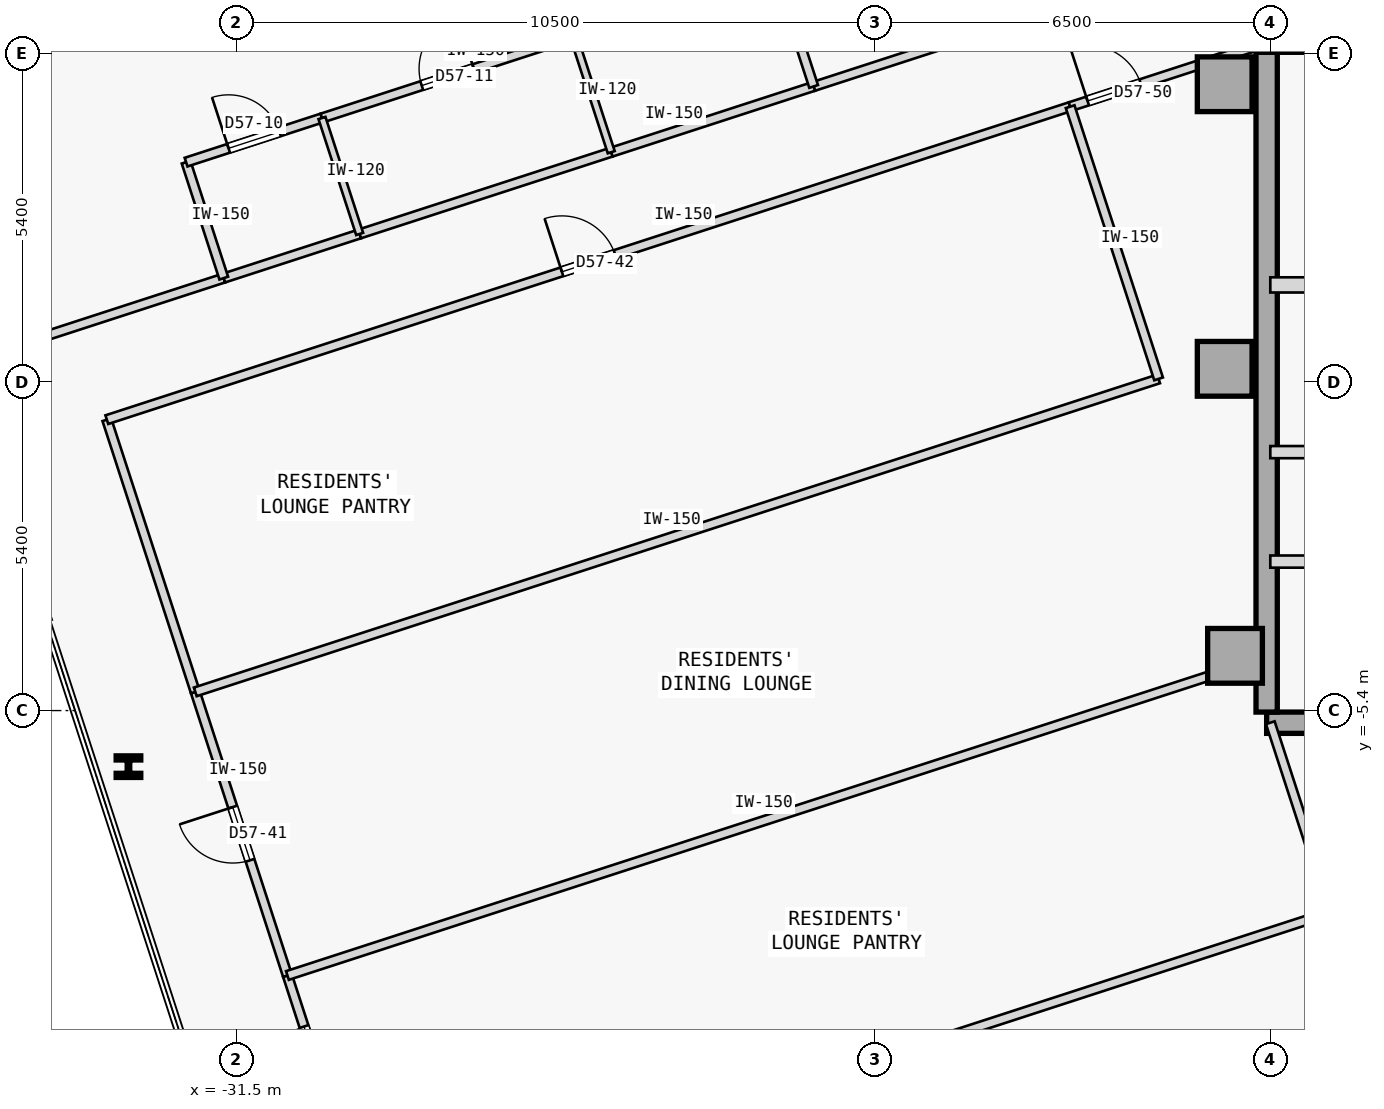
"""IFC4 building model, lengths in metres.
Left out: names, types, materials, properties, quantities, classifications, styles, units other than length and angle.
Written with IfcOpenShell. Run it as: python <this file> out.ifc"""

import sys

from ifc_helpers import new_model, si_unit, direction, frame, frame_2d, origin, origin_2d, place, context, subcontext, project, spatial, rectangle, i_section, extrude, element, fill, save


model = new_model("IFC4")
c1 = context("Model", 3, precision=1e-05, world=origin(), true_north=direction((0.0, 1.0)))
c2 = subcontext(c1, "Body", "Model", "MODEL_VIEW")
j1 = project(units=[si_unit("LENGTHUNIT", "METRE"), si_unit("PLANEANGLEUNIT", "RADIAN")], contexts=[c1])
p1 = place(None, origin())
s1 = spatial("IfcSite", under=j1, at=p1, CompositionType="ELEMENT")
p2 = place(p1, origin())
s2 = spatial("IfcBuilding", under=s1, at=p2, CompositionType="ELEMENT")
p3 = place(p2, frame((0.0, 0.0, 217.6)))
s3 = spatial("IfcBuildingStorey", under=s2, at=p3, CompositionType="ELEMENT", Elevation=217.6)
for number, where, z_axis, x_axis in (
    (1, (-15.25, 4.9, 0.0), (0.0, 0.0, 1.0), (1.0, 0.0, 0.0)),
    (2, (-15.25, 0.22, 0.0), (0.0, 0.0, 1.0), (1.0, 0.0, 0.0)),
    (3, (-15.08, -4.5, 0.0), (0.0, 0.0, 1.0), (1.0, 0.0, 0.0)),
):
    element("IfcColumn", number, at=place(p3, frame(where, z_axis=z_axis, x_axis=x_axis)), inside=s3, PredefinedType="COLUMN", context=c2, shape_type="SweptSolid", body=[
        extrude(rectangle(XDim=0.9, YDim=0.9, at=origin_2d()), origin(), (0.0, 0.0, 1.0), 3.35),
    ])
p4 = place(p3, frame((-14.56, -5.6, 0.0), z_axis=(0.0, 0.0, 1.0), x_axis=(1.0, 0.0, 0.0)))
e4 = element("IfcWall", 4, at=p4, inside=s3, PredefinedType="SHEAR", context=c2, shape_type="SweptSolid", body=[
    extrude(rectangle(XDim=10.86, YDim=0.35, at=frame_2d((5.43, 0.0))), origin(), (0.0, 0.0, 1.0), 3.125),
])
p5 = place(p3, frame((-14.56, -5.425, 0.0), z_axis=(0.0, 0.0, 1.0), x_axis=(0.0, 1.0, 0.0)))
e5 = element("IfcWall", 5, at=p5, inside=s3, PredefinedType="SHEAR", context=c2, shape_type="SweptSolid", body=[
    extrude(rectangle(XDim=10.85, YDim=0.35, at=frame_2d((5.425, 0.0))), origin(), (0.0, 0.0, 1.0), 3.125),
])
p6 = place(p3, frame((-33.278, -6.322, 0.0), z_axis=(0.0, 0.0, 1.0), x_axis=(1.0, 0.0, 0.0)))
e6 = element("IfcColumn", 6, at=p6, inside=s3, PredefinedType="COLUMN", context=c2, shape_type="SweptSolid", body=[
    extrude(i_section(OverallWidth=0.405, OverallDepth=0.355, WebThickness=0.042, FlangeThickness=0.068, FilletRadius=0.015, at=origin_2d()), origin(), (0.0, 0.0, 1.0), 3.35),
])
p7 = place(p3, frame((-14.5, 1.6, 0.0), z_axis=(0.0, 0.0, 1.0), x_axis=(1.0, 0.0, 0.0)))
e7 = element("IfcWall", 7, at=p7, inside=s3, PredefinedType="STANDARD", context=c2, shape_type="SweptSolid", body=[
    extrude(rectangle(XDim=3.6, YDim=0.25, at=frame_2d((1.8, 0.0))), origin(), (0.0, 0.0, 1.0), 3.125),
])
p8 = place(p7, frame((0.92, 0.0, 0.0)))
e8 = element("IfcOpeningElement", 8, at=p8, cuts=e7, PredefinedType="OPENING", context=c2, shape_type="SweptSolid", body=[
    extrude(rectangle(XDim=1.05, YDim=2.15, at=frame_2d((0.525, 1.075))), frame((0.0, 0.135, 0.0), z_axis=(0.0, -1.0, 0.0), x_axis=(1.0, 0.0, 0.0)), (0.0, 0.0, 1.0), 0.27),
])
p9 = place(p3, frame((-14.5, -1.15, 0.0), z_axis=(0.0, 0.0, 1.0), x_axis=(1.0, 0.0, 0.0)))
e9 = element("IfcWall", 9, at=p9, inside=s3, PredefinedType="STANDARD", context=c2, shape_type="SweptSolid", body=[
    extrude(rectangle(XDim=2.95, YDim=0.2, at=frame_2d((1.475, 0.0))), origin(), (0.0, 0.0, 1.0), 3.125),
])
p10 = place(p9, frame((0.75, 0.0, 0.0)))
e10 = element("IfcOpeningElement", 10, at=p10, cuts=e9, PredefinedType="OPENING", context=c2, shape_type="SweptSolid", body=[
    extrude(rectangle(XDim=1.05, YDim=2.18, at=frame_2d((0.525, 1.09))), frame((0.0, 0.11, 0.0), z_axis=(0.0, -1.0, 0.0), x_axis=(1.0, 0.0, 0.0)), (0.0, 0.0, 1.0), 0.22),
])
p11 = place(p3, frame((-14.5, -2.95, 0.0), z_axis=(0.0, 0.0, 1.0), x_axis=(1.0, 0.0, 0.0)))
e11 = element("IfcWall", 11, at=p11, inside=s3, PredefinedType="STANDARD", context=c2, shape_type="SweptSolid", body=[
    extrude(rectangle(XDim=10.8, YDim=0.2, at=frame_2d((5.4, 0.0))), origin(), (0.0, 0.0, 1.0), 3.125),
])
p12 = place(p11, frame((9.17, 0.0, 0.0)))
e12 = element("IfcOpeningElement", 12, at=p12, cuts=e11, PredefinedType="OPENING", context=c2, shape_type="SweptSolid", body=[
    extrude(rectangle(XDim=1.1, YDim=2.15, at=frame_2d((0.55, 1.075))), frame((0.0, 0.11, 0.0), z_axis=(0.0, -1.0, 0.0), x_axis=(1.0, 0.0, 0.0)), (0.0, 0.0, 1.0), 0.22),
])
p13 = place(p11, frame((2.33, 0.0, 0.0)))
e13 = element("IfcOpeningElement", 13, at=p13, cuts=e11, PredefinedType="OPENING", context=c2, shape_type="SweptSolid", body=[
    extrude(rectangle(XDim=0.92, YDim=2.15, at=frame_2d((0.46, 1.075))), frame((0.0, 0.11, 0.0), z_axis=(0.0, -1.0, 0.0), x_axis=(1.0, 0.0, 0.0)), (0.0, 0.0, 1.0), 0.22),
])
p14 = place(p11, frame((6.65, 0.0, 0.0)))
e14 = element("IfcOpeningElement", 14, at=p14, cuts=e11, PredefinedType="OPENING", context=c2, shape_type="SweptSolid", body=[
    extrude(rectangle(XDim=0.92, YDim=2.15, at=frame_2d((0.46, 1.075))), frame((0.0, 0.11, 0.0), z_axis=(0.0, -1.0, 0.0), x_axis=(1.0, 0.0, 0.0)), (0.0, 0.0, 1.0), 0.22),
])
p15 = place(p3, frame((-36.012, 0.314, 0.0), z_axis=(0.0, 0.0, 1.0), x_axis=(0.951052710898, 0.309028705936, 0.0)))
e15 = element("IfcWall", 15, at=p15, inside=s3, PredefinedType="PARTITIONING", context=c2, shape_type="SweptSolid", body=[
    extrude(rectangle(XDim=4.523, YDim=0.15, at=frame_2d((2.261, 0.0))), origin(), (0.0, 0.0, 1.0), 3.125),
])
p16 = place(p3, frame((-22.01, 4.864, 0.0), z_axis=(0.0, 0.0, 1.0), x_axis=(0.951061595649, 0.309001361293, 0.0)))
e16 = element("IfcWall", 16, at=p16, inside=s3, PredefinedType="PARTITIONING", context=c2, shape_type="SweptSolid", body=[
    extrude(rectangle(XDim=5.409, YDim=0.15, at=frame_2d((2.705, 0.0))), origin(), (0.0, 0.0, 1.0), 3.125),
])
p17 = place(p16, frame((2.229, 0.0, 0.0)))
e17 = element("IfcOpeningElement", 17, at=p17, cuts=e16, PredefinedType="OPENING", context=c2, shape_type="SweptSolid", body=[
    extrude(rectangle(XDim=0.95, YDim=2.15, at=frame_2d((0.475, 1.075))), frame((0.0, 0.085, 0.0), z_axis=(0.0, -1.0, 0.0), x_axis=(1.0, 0.0, 0.0)), (0.0, 0.0, 1.0), 0.17),
])
p18 = place(p3, frame((-31.711, 1.712, 0.0), z_axis=(0.0, 0.0, 1.0), x_axis=(0.951076048914, 0.308956872689, 0.0)))
e18 = element("IfcWall", 18, at=p18, inside=s3, PredefinedType="PARTITIONING", context=c2, shape_type="SweptSolid", body=[
    extrude(rectangle(XDim=2.35, YDim=0.15, at=frame_2d((1.175, 0.0))), origin(), (0.0, 0.0, 1.0), 3.125),
])
p19 = place(p3, frame((-29.476, 2.438, 0.0), z_axis=(0.0, 0.0, 1.0), x_axis=(0.951057987102, 0.309012467661, 0.0)))
e19 = element("IfcWall", 19, at=p19, inside=s3, PredefinedType="PARTITIONING", context=c2, shape_type="SweptSolid", body=[
    extrude(rectangle(XDim=4.35, YDim=0.15, at=frame_2d((2.175, 0.0))), origin(), (0.0, 0.0, 1.0), 3.125),
])
p20 = place(p3, frame((-25.338, 3.782, 0.0), z_axis=(0.0, 0.0, 1.0), x_axis=(0.951055596592, 0.309019824916, 0.0)))
e20 = element("IfcWall", 20, at=p20, inside=s3, PredefinedType="PARTITIONING", context=c2, shape_type="SweptSolid", body=[
    extrude(rectangle(XDim=3.5, YDim=0.15, at=frame_2d((1.75, 0.0))), origin(), (0.0, 0.0, 1.0), 3.125),
])
p21 = place(p3, frame((-29.833, -12.311, 0.0), z_axis=(0.0, 0.0, 1.0), x_axis=(-0.309044953986, 0.951047431213, 0.0)))
e21 = element("IfcWall", 21, at=p21, inside=s3, PredefinedType="PARTITIONING", context=c2, shape_type="SweptSolid", body=[
    extrude(rectangle(XDim=2.685, YDim=0.15, at=frame_2d((1.343, 0.0))), origin(), (0.0, 0.0, 1.0), 3.125),
])
p22 = place(p21, frame((0.883, 0.0, 0.0)))
e22 = element("IfcOpeningElement", 22, at=p22, cuts=e21, PredefinedType="OPENING", context=c2, shape_type="SweptSolid", body=[
    extrude(rectangle(XDim=0.92, YDim=2.15, at=frame_2d((0.46, 1.075))), frame((0.0, 0.085, 0.0), z_axis=(0.0, -1.0, 0.0), x_axis=(1.0, 0.0, 0.0)), (0.0, 0.0, 1.0), 0.17),
])
p23 = place(p3, frame((-30.663, -9.757, 0.0), z_axis=(0.0, 0.0, 1.0), x_axis=(-0.309019653166, 0.951055652397, 0.0)))
e23 = element("IfcWall", 23, at=p23, inside=s3, PredefinedType="PARTITIONING", context=c2, shape_type="SweptSolid", body=[
    extrude(rectangle(XDim=4.904, YDim=0.15, at=frame_2d((2.452, 0.0))), origin(), (0.0, 0.0, 1.0), 3.125),
])
p24 = place(p23, frame((1.992, 0.0, 0.0)))
e24 = element("IfcOpeningElement", 24, at=p24, cuts=e23, PredefinedType="OPENING", context=c2, shape_type="SweptSolid", body=[
    extrude(rectangle(XDim=0.92, YDim=2.15, at=frame_2d((0.46, 1.075))), frame((0.0, 0.085, 0.0), z_axis=(0.0, -1.0, 0.0), x_axis=(1.0, 0.0, 0.0)), (0.0, 0.0, 1.0), 0.17),
])
p25 = place(p3, frame((-32.179, -5.093, 0.0), z_axis=(0.0, 0.0, 1.0), x_axis=(-0.309014532869, 0.951057316083, 0.0)))
e25 = element("IfcWall", 25, at=p25, inside=s3, PredefinedType="PARTITIONING", context=c2, shape_type="SweptSolid", body=[
    extrude(rectangle(XDim=4.707, YDim=0.15, at=frame_2d((2.354, 0.0))), origin(), (0.0, 0.0, 1.0), 3.125),
])
p26 = place(p3, frame((-33.633, -0.616, 0.0), z_axis=(0.0, 0.0, 1.0), x_axis=(0.951058192995, 0.309011833974, 0.0)))
e26 = element("IfcWall", 26, at=p26, inside=s3, PredefinedType="PARTITIONING", context=c2, shape_type="SweptSolid", body=[
    extrude(rectangle(XDim=16.657, YDim=0.15, at=frame_2d((8.329, 0.0))), origin(), (0.0, 0.0, 1.0), 3.125),
])
p27 = place(p26, frame((7.868, 0.0, 0.0)))
e27 = element("IfcOpeningElement", 27, at=p27, cuts=e26, PredefinedType="OPENING", context=c2, shape_type="SweptSolid", body=[
    extrude(rectangle(XDim=0.92, YDim=2.15, at=frame_2d((0.46, 1.075))), frame((0.0, 0.085, 0.0), z_axis=(0.0, -1.0, 0.0), x_axis=(1.0, 0.0, 0.0)), (0.0, 0.0, 1.0), 0.17),
])
p28 = place(p3, frame((-17.792, 4.531, 0.0), z_axis=(0.0, 0.0, 1.0), x_axis=(0.951047546178, 0.309044600193, 0.0)))
e28 = element("IfcWall", 28, at=p28, inside=s3, PredefinedType="PARTITIONING", context=c2, shape_type="SweptSolid", body=[
    extrude(rectangle(XDim=3.461, YDim=0.15, at=frame_2d((1.73, 0.0))), origin(), (0.0, 0.0, 1.0), 3.125),
])
p29 = place(p28, frame((0.302, 0.0, 0.0)))
e29 = element("IfcOpeningElement", 29, at=p29, cuts=e28, PredefinedType="OPENING", context=c2, shape_type="SweptSolid", body=[
    extrude(rectangle(XDim=0.92, YDim=2.15, at=frame_2d((0.46, 1.075))), frame((0.0, 0.085, 0.0), z_axis=(0.0, -1.0, 0.0), x_axis=(1.0, 0.0, 0.0)), (0.0, 0.0, 1.0), 0.17),
])
p30 = place(p3, frame((-31.711, 1.712, 0.0), z_axis=(0.0, 0.0, 1.0), x_axis=(-0.308948390121, 0.951078804433, 0.0)))
e30 = element("IfcWall", 30, at=p30, inside=s3, PredefinedType="PARTITIONING", context=c2, shape_type="SweptSolid", body=[
    extrude(rectangle(XDim=2.005, YDim=0.15, at=frame_2d((1.002, 0.0))), origin(), (0.0, 0.0, 1.0), 3.125),
])
p31 = place(p3, frame((-32.33, 3.619, 0.0), z_axis=(0.0, 0.0, 1.0), x_axis=(0.951066131077, 0.308987401554, 0.0)))
e31 = element("IfcWall", 31, at=p31, inside=s3, PredefinedType="PARTITIONING", context=c2, shape_type="SweptSolid", body=[
    extrude(rectangle(XDim=2.35, YDim=0.15, at=frame_2d((1.175, 0.0))), origin(), (0.0, 0.0, 1.0), 3.125),
])
p32 = place(p31, frame((0.735, 0.0, 0.0)))
e32 = element("IfcOpeningElement", 32, at=p32, cuts=e31, PredefinedType="OPENING", context=c2, shape_type="SweptSolid", body=[
    extrude(rectangle(XDim=0.88, YDim=2.15, at=frame_2d((0.44, 1.075))), frame((0.0, 0.085, 0.0), z_axis=(0.0, -1.0, 0.0), x_axis=(1.0, 0.0, 0.0)), (0.0, 0.0, 1.0), 0.17),
])
p33 = place(p3, frame((-30.095, 4.345, 0.0), z_axis=(0.0, 0.0, 1.0), x_axis=(0.951041492154, 0.309063230101, 0.0)))
e33 = element("IfcWall", 33, at=p33, inside=s3, PredefinedType="PARTITIONING", context=c2, shape_type="SweptSolid", body=[
    extrude(rectangle(XDim=4.35, YDim=0.15, at=frame_2d((2.175, 0.0))), origin(), (0.0, 0.0, 1.0), 3.125),
])
p34 = place(p33, frame((1.725, 0.0, 0.0)))
e34 = element("IfcOpeningElement", 34, at=p34, cuts=e33, PredefinedType="OPENING", context=c2, shape_type="SweptSolid", body=[
    extrude(rectangle(XDim=0.9, YDim=2.15, at=frame_2d((0.45, 1.075))), frame((0.0, 0.085, 0.0), z_axis=(0.0, -1.0, 0.0), x_axis=(1.0, 0.0, 0.0)), (0.0, 0.0, 1.0), 0.17),
])
p35 = place(p3, frame((-22.01, 4.864, 0.0), z_axis=(0.0, 0.0, 1.0), x_axis=(-0.309058537449, 0.951043017129, 0.0)))
e35 = element("IfcWall", 35, at=p35, inside=s3, PredefinedType="PARTITIONING", context=c2, shape_type="SweptSolid", body=[
    extrude(rectangle(XDim=2.005, YDim=0.15, at=frame_2d((1.002, 0.0))), origin(), (0.0, 0.0, 1.0), 3.125),
])
p36 = place(p3, frame((-29.476, 2.438, 0.0), z_axis=(0.0, 0.0, 1.0), x_axis=(-0.309058537449, 0.951043017129, 0.0)))
e36 = element("IfcWall", 36, at=p36, inside=s3, PredefinedType="PARTITIONING", context=c2, shape_type="SweptSolid", body=[
    extrude(rectangle(XDim=2.005, YDim=0.12, at=frame_2d((1.002, 0.0))), origin(), (0.0, 0.0, 1.0), 3.125),
])
p37 = place(p3, frame((-25.338, 3.782, 0.0), z_axis=(0.0, 0.0, 1.0), x_axis=(-0.309022749039, 0.951054646472, 0.0)))
e37 = element("IfcWall", 37, at=p37, inside=s3, PredefinedType="PARTITIONING", context=c2, shape_type="SweptSolid", body=[
    extrude(rectangle(XDim=2.005, YDim=0.12, at=frame_2d((1.002, 0.0))), origin(), (0.0, 0.0, 1.0), 3.125),
])
p38 = place(p3, frame((-31.208, -14.471, 0.0), z_axis=(0.0, 0.0, 1.0), x_axis=(0.951057753948, 0.309013185244, 0.0)))
e38 = element("IfcWall", 38, at=p38, inside=s3, PredefinedType="PARTITIONING", context=c2, shape_type="SweptSolid", body=[
    extrude(rectangle(XDim=18.632, YDim=0.15, at=frame_2d((9.316, 0.0))), origin(), (0.0, 0.0, 1.0), 3.125),
])
p39 = place(p3, frame((-30.663, -9.757, 0.0), z_axis=(0.0, 0.0, 1.0), x_axis=(0.951058192995, 0.309011833974, 0.0)))
e39 = element("IfcWall", 39, at=p39, inside=s3, PredefinedType="PARTITIONING", context=c2, shape_type="SweptSolid", body=[
    extrude(rectangle(XDim=16.657, YDim=0.15, at=frame_2d((8.329, 0.0))), origin(), (0.0, 0.0, 1.0), 3.125),
])
p40 = place(p3, frame((-13.488, -8.713, 0.0), z_axis=(0.0, 0.0, 1.0), x_axis=(-0.309082700143, 0.951035164687, 0.0)))
e40 = element("IfcWall", 40, at=p40, inside=s3, PredefinedType="PARTITIONING", context=c2, shape_type="SweptSolid", body=[
    extrude(rectangle(XDim=3.274, YDim=0.15, at=frame_2d((1.637, 0.0))), origin(), (0.0, 0.0, 1.0), 3.125),
])
p41 = place(p3, frame((-32.179, -5.093, 0.0), z_axis=(0.0, 0.0, 1.0), x_axis=(0.951053885426, 0.309025091239, 0.0)))
e41 = element("IfcWall", 41, at=p41, inside=s3, PredefinedType="PARTITIONING", context=c2, shape_type="SweptSolid", body=[
    extrude(rectangle(XDim=16.657, YDim=0.15, at=frame_2d((8.329, 0.0))), origin(), (0.0, 0.0, 1.0), 3.125),
])
p42 = place(p3, frame((-16.337, 0.054, 0.0), z_axis=(0.0, 0.0, 1.0), x_axis=(-0.309029776355, 0.951052363083, 0.0)))
e42 = element("IfcWall", 42, at=p42, inside=s3, PredefinedType="PARTITIONING", context=c2, shape_type="SweptSolid", body=[
    extrude(rectangle(XDim=4.707, YDim=0.15, at=frame_2d((2.354, 0.0))), origin(), (0.0, 0.0, 1.0), 3.125),
])
p43 = place(p32, origin())
e43 = element("IfcDoor", 43, at=p43, inside=s3, OperationType="SINGLE_SWING_LEFT", PredefinedType="DOOR", context=c2, shape_type="SweptSolid", body=[
    extrude(rectangle(XDim=0.88, YDim=2.15, at=frame_2d((0.44, 1.075))), frame((0.0, 0.025, 0.0), z_axis=(0.0, -1.0, 0.0), x_axis=(1.0, 0.0, 0.0)), (0.0, 0.0, 1.0), 0.05),
])
fill(e32, e43)
p44 = place(p34, origin())
e44 = element("IfcDoor", 44, at=p44, inside=s3, OperationType="SINGLE_SWING_RIGHT", PredefinedType="DOOR", context=c2, shape_type="SweptSolid", body=[
    extrude(rectangle(XDim=0.9, YDim=2.15, at=frame_2d((0.45, 1.075))), frame((0.0, 0.025, 0.0), z_axis=(0.0, -1.0, 0.0), x_axis=(1.0, 0.0, 0.0)), (0.0, 0.0, 1.0), 0.05),
])
fill(e34, e44)
p45 = place(p22, origin())
e45 = element("IfcDoor", 45, at=p45, inside=s3, OperationType="SINGLE_SWING_LEFT", PredefinedType="DOOR", context=c2, shape_type="SweptSolid", body=[
    extrude(rectangle(XDim=0.92, YDim=2.15, at=frame_2d((0.46, 1.075))), frame((0.0, 0.025, 0.0), z_axis=(0.0, -1.0, 0.0), x_axis=(1.0, 0.0, 0.0)), (0.0, 0.0, 1.0), 0.05),
])
fill(e22, e45)
p46 = place(p24, origin())
e46 = element("IfcDoor", 46, at=p46, inside=s3, OperationType="SINGLE_SWING_RIGHT", PredefinedType="DOOR", context=c2, shape_type="SweptSolid", body=[
    extrude(rectangle(XDim=0.92, YDim=2.15, at=frame_2d((0.46, 1.075))), frame((0.0, 0.025, 0.0), z_axis=(0.0, -1.0, 0.0), x_axis=(1.0, 0.0, 0.0)), (0.0, 0.0, 1.0), 0.05),
])
fill(e24, e46)
p47 = place(p27, origin())
e47 = element("IfcDoor", 47, at=p47, inside=s3, OperationType="SINGLE_SWING_LEFT", PredefinedType="DOOR", context=c2, shape_type="SweptSolid", body=[
    extrude(rectangle(XDim=0.92, YDim=2.15, at=frame_2d((0.46, 1.075))), frame((0.0, 0.025, 0.0), z_axis=(0.0, -1.0, 0.0), x_axis=(1.0, 0.0, 0.0)), (0.0, 0.0, 1.0), 0.05),
])
fill(e27, e47)
p48 = place(p29, origin())
e48 = element("IfcDoor", 48, at=p48, inside=s3, OperationType="SINGLE_SWING_LEFT", PredefinedType="DOOR", context=c2, shape_type="SweptSolid", body=[
    extrude(rectangle(XDim=0.92, YDim=2.15, at=frame_2d((0.46, 1.075))), frame((0.0, 0.025, 0.0), z_axis=(0.0, -1.0, 0.0), x_axis=(1.0, 0.0, 0.0)), (0.0, 0.0, 1.0), 0.05),
])
fill(e29, e48)
save(model, sys.argv[1])
